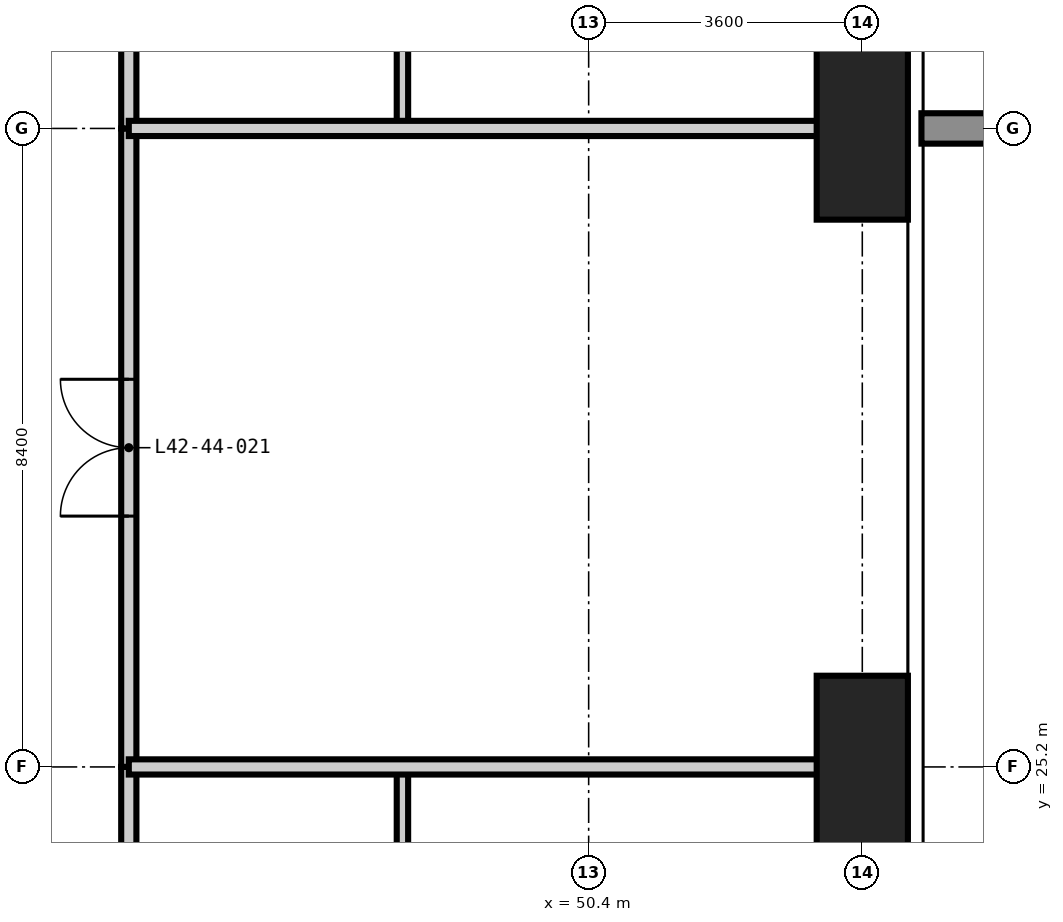
"""IFC4 building model, lengths in metres.
Left out: names, types, materials, properties, quantities, classifications, styles, units other than length and angle.
Written with IfcOpenShell. Run it as: python <this file> out.ifc"""

import sys

from ifc_helpers import new_model, si_unit, direction, frame, frame_2d, origin, origin_2d, place, context, subcontext, project, spatial, rectangle, extrude, element, fill, save


model = new_model("IFC4")
c1 = context("Model", 3, precision=1e-05, world=origin(), true_north=direction((0.0, 1.0)))
c2 = subcontext(c1, "Body", "Model", "MODEL_VIEW")
j1 = project(units=[si_unit("LENGTHUNIT", "METRE"), si_unit("PLANEANGLEUNIT", "RADIAN")], contexts=[c1])
p1 = place(None, origin())
s1 = spatial("IfcSite", under=j1, at=p1, CompositionType="ELEMENT")
p2 = place(p1, origin())
s2 = spatial("IfcBuilding", under=s1, at=p2, CompositionType="ELEMENT")
p3 = place(p2, frame((0.0, 0.0, 166.2)))
s3 = spatial("IfcBuildingStorey", under=s2, at=p3, CompositionType="ELEMENT", Elevation=166.2)
for number, where, z_axis, x_axis in (
    (1, (54.0, 25.2, -0.35), (0.0, 0.0, 1.0), (1.0, 0.0, 0.0)),
    (2, (54.0, 33.6, -0.35), (0.0, 0.0, 1.0), (1.0, 0.0, 0.0)),
):
    element("IfcColumn", number, at=place(p3, frame(where, z_axis=z_axis, x_axis=x_axis)), inside=s3, PredefinedType="COLUMN", context=c2, shape_type="SweptSolid", body=[
        extrude(rectangle(XDim=1.2, YDim=2.4, at=origin_2d()), origin(), (0.0, 0.0, 1.0), 3.6),
    ])
for number, where, z_axis, x_axis in (
    (3, (47.95, 22.8, 0.0), (0.0, 0.0, 1.0), (0.0, 1.0, 0.0)),
    (4, (47.95, 33.6, 0.0), (0.0, 0.0, 1.0), (0.0, 1.0, 0.0)),
):
    element("IfcWall", number, at=place(p3, frame(where, z_axis=z_axis, x_axis=x_axis)), inside=s3, PredefinedType="PARTITIONING", context=c2, shape_type="SweptSolid", body=[
        extrude(rectangle(XDim=2.4, YDim=0.15, at=frame_2d((1.2, 0.0))), origin(), (0.0, 0.0, 1.0), 3.25),
    ])
p4 = place(p3, frame((44.35, 25.2, 0.0), z_axis=(0.0, 0.0, 1.0), x_axis=(0.0, 1.0, 0.0)))
e5 = element("IfcWall", 5, at=p4, inside=s3, PredefinedType="PARTITIONING", context=c2, shape_type="SweptSolid", body=[
    extrude(rectangle(XDim=8.4, YDim=0.2, at=frame_2d((4.2, 0.0))), origin(), (0.0, 0.0, 1.0), 3.25),
])
p5 = place(p4, frame((3.3, 0.0, 0.0)))
e6 = element("IfcOpeningElement", 6, at=p5, cuts=e5, PredefinedType="OPENING", context=c2, shape_type="SweptSolid", body=[
    extrude(rectangle(XDim=1.8, YDim=2.4, at=frame_2d((0.9, 1.2))), frame((0.0, 0.11, 0.0), z_axis=(0.0, -1.0, 0.0), x_axis=(1.0, 0.0, 0.0)), (0.0, 0.0, 1.0), 0.22),
])
p6 = place(p3, frame((44.35, 25.2, 0.0), z_axis=(0.0, 0.0, 1.0), x_axis=(0.0, -1.0, 0.0)))
e7 = element("IfcWall", 7, at=p6, inside=s3, PredefinedType="PARTITIONING", context=c2, shape_type="SweptSolid", body=[
    extrude(rectangle(XDim=11.95, YDim=0.2, at=frame_2d((5.975, 0.0))), origin(), (0.0, 0.0, 1.0), 3.25),
])
p7 = place(p6, frame((4.6, 0.0, 0.0)))
e8 = element("IfcOpeningElement", 8, at=p7, cuts=e7, PredefinedType="OPENING", context=c2, shape_type="SweptSolid", body=[
    extrude(rectangle(XDim=1.0, YDim=2.2, at=frame_2d((0.5, 1.1))), frame((0.0, 0.11, 0.0), z_axis=(0.0, -1.0, 0.0), x_axis=(1.0, 0.0, 0.0)), (0.0, 0.0, 1.0), 0.22),
])
p8 = place(p6, frame((2.8, 0.0, 0.0)))
e9 = element("IfcOpeningElement", 9, at=p8, cuts=e7, PredefinedType="OPENING", context=c2, shape_type="SweptSolid", body=[
    extrude(rectangle(XDim=1.0, YDim=2.2, at=frame_2d((0.5, 1.1))), frame((0.0, 0.11, 0.0), z_axis=(0.0, -1.0, 0.0), x_axis=(1.0, 0.0, 0.0)), (0.0, 0.0, 1.0), 0.22),
])
p9 = place(p6, frame((9.675, 0.0, 0.0)))
e10 = element("IfcOpeningElement", 10, at=p9, cuts=e7, PredefinedType="OPENING", context=c2, shape_type="SweptSolid", body=[
    extrude(rectangle(XDim=1.0, YDim=2.2, at=frame_2d((0.5, 1.1))), frame((0.0, 0.11, 0.0), z_axis=(0.0, -1.0, 0.0), x_axis=(1.0, 0.0, 0.0)), (0.0, 0.0, 1.0), 0.22),
])
p10 = place(p3, frame((44.35, 44.95, 0.0), z_axis=(0.0, 0.0, 1.0), x_axis=(0.0, -1.0, 0.0)))
e11 = element("IfcWall", 11, at=p10, inside=s3, PredefinedType="PARTITIONING", context=c2, shape_type="SweptSolid", body=[
    extrude(rectangle(XDim=11.35, YDim=0.2, at=frame_2d((5.675, 0.0))), origin(), (0.0, 0.0, 1.0), 3.25),
])
p11 = place(p10, frame((7.55, 0.0, 0.0)))
e12 = element("IfcOpeningElement", 12, at=p11, cuts=e11, PredefinedType="OPENING", context=c2, shape_type="SweptSolid", body=[
    extrude(rectangle(XDim=1.0, YDim=2.2, at=frame_2d((0.5, 1.1))), frame((0.0, 0.11, 0.0), z_axis=(0.0, -1.0, 0.0), x_axis=(1.0, 0.0, 0.0)), (0.0, 0.0, 1.0), 0.22),
])
p12 = place(p10, frame((5.75, 0.0, 0.0)))
e13 = element("IfcOpeningElement", 13, at=p12, cuts=e11, PredefinedType="OPENING", context=c2, shape_type="SweptSolid", body=[
    extrude(rectangle(XDim=1.0, YDim=2.2, at=frame_2d((0.5, 1.1))), frame((0.0, 0.11, 0.0), z_axis=(0.0, -1.0, 0.0), x_axis=(1.0, 0.0, 0.0)), (0.0, 0.0, 1.0), 0.22),
])
p13 = place(p10, frame((0.975, 0.0, 0.0)))
e14 = element("IfcOpeningElement", 14, at=p13, cuts=e11, PredefinedType="OPENING", context=c2, shape_type="SweptSolid", body=[
    extrude(rectangle(XDim=1.0, YDim=2.2, at=frame_2d((0.5, 1.1))), frame((0.0, 0.11, 0.0), z_axis=(0.0, -1.0, 0.0), x_axis=(1.0, 0.0, 0.0)), (0.0, 0.0, 1.0), 0.22),
])
for number, where, z_axis, x_axis in (
    (15, (44.35, 25.2, 0.0), (0.0, 0.0, 1.0), (1.0, 0.0, 0.0)),
    (16, (44.35, 33.6, 0.0), (0.0, 0.0, 1.0), (1.0, 0.0, 0.0)),
):
    element("IfcWall", number, at=place(p3, frame(where, z_axis=z_axis, x_axis=x_axis)), inside=s3, PredefinedType="PARTITIONING", context=c2, shape_type="SweptSolid", body=[
        extrude(rectangle(XDim=10.268, YDim=0.2, at=frame_2d((5.134, 0.0))), origin(), (0.0, 0.0, 1.0), 3.25),
    ])
p14 = place(p5, origin())
e17 = element("IfcDoor", 17, at=p14, inside=s3, OperationType="DOUBLE_DOOR_DOUBLE_SWING", PredefinedType="DOOR", context=c2, shape_type="SweptSolid", body=[
    extrude(rectangle(XDim=1.8, YDim=2.4, at=frame_2d((0.9, 1.2))), frame((0.0, 0.025, 0.0), z_axis=(0.0, -1.0, 0.0), x_axis=(1.0, 0.0, 0.0)), (0.0, 0.0, 1.0), 0.05),
])
fill(e6, e17)
save(model, sys.argv[1])
